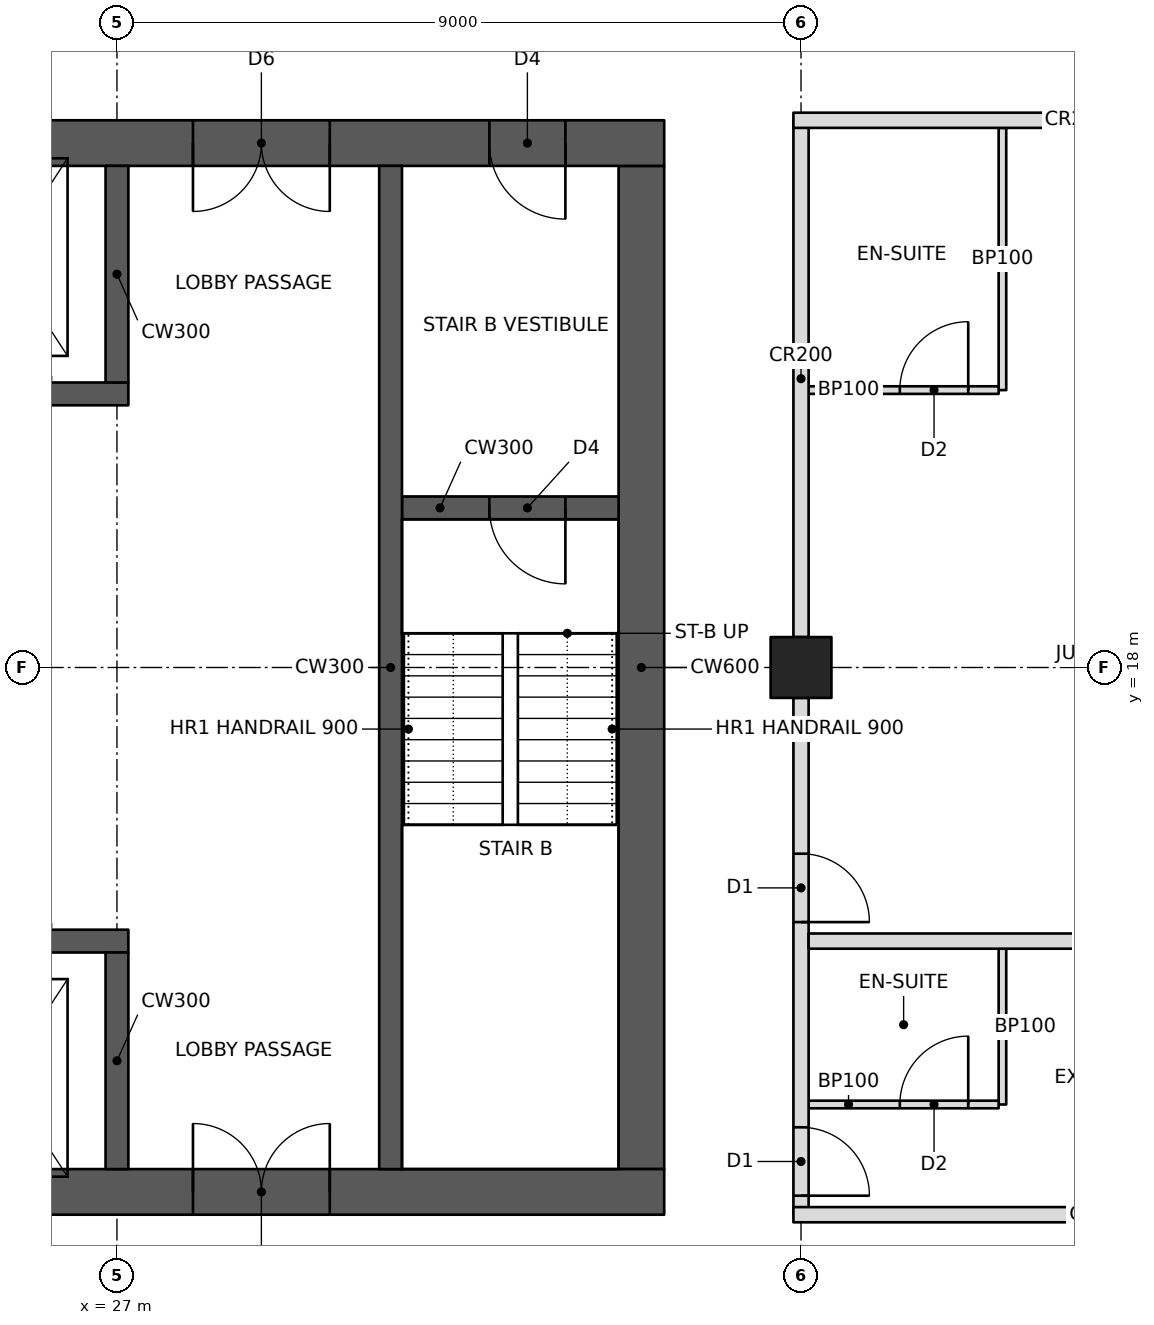
"""IFC4 building model, lengths in metres.
Left out: names, types, materials, properties, quantities, classifications, styles, units other than length and angle.
Written with IfcOpenShell. Run it as: python <this file> out.ifc"""

import sys

from ifc_helpers import new_model, si_unit, direction, frame, frame_2d, origin, origin_2d, place, context, subcontext, project, spatial, rectangle, hollow_rectangle, extrude, element, fill, save


model = new_model("IFC4")
c1 = context("Model", 3, precision=1e-05, world=origin(), true_north=direction((0.0, 1.0)))
c2 = subcontext(c1, "Body", "Model", "MODEL_VIEW")
j1 = project(units=[si_unit("LENGTHUNIT", "METRE"), si_unit("PLANEANGLEUNIT", "RADIAN")], contexts=[c1])
p1 = place(None, origin())
s1 = spatial("IfcSite", under=j1, at=p1, CompositionType="ELEMENT")
p2 = place(p1, origin())
s2 = spatial("IfcBuilding", under=s1, at=p2, CompositionType="ELEMENT")
p3 = place(p2, frame((0.0, 0.0, 174.0)))
s3 = spatial("IfcBuildingStorey", under=s2, at=p3, CompositionType="ELEMENT", Elevation=174.0)
p4 = place(p3, frame((36.0, 18.0, 0.0), z_axis=(0.0, 0.0, 1.0), x_axis=(0.0, 1.0, 0.0)))
e1 = element("IfcColumn", 1, at=p4, inside=s3, PredefinedType="COLUMN", context=c2, shape_type="SweptSolid", body=[
    extrude(hollow_rectangle(XDim=0.8, YDim=0.8, WallThickness=0.06, at=origin_2d()), origin(), (0.0, 0.0, 1.0), 3.4),
])
p5 = place(p3, frame((10.8, 11.1, 0.0), z_axis=(0.0, 0.0, 1.0), x_axis=(1.0, 0.0, 0.0)))
e2 = element("IfcWall", 2, at=p5, inside=s3, PredefinedType="SHEAR", context=c2, shape_type="SweptSolid", body=[
    extrude(rectangle(XDim=23.4, YDim=0.6, at=frame_2d((11.7, 0.0))), origin(), (0.0, 0.0, 1.0), 3.4),
])
p6 = place(p5, frame((1.0, 0.0, 0.0)))
e3 = element("IfcOpeningElement", 3, at=p6, cuts=e2, PredefinedType="OPENING", context=c2, shape_type="SweptSolid", body=[
    extrude(rectangle(XDim=1.0, YDim=2.1, at=frame_2d((0.5, 1.05))), frame((0.0, 0.31, 0.0), z_axis=(0.0, -1.0, 0.0), x_axis=(1.0, 0.0, 0.0)), (0.0, 0.0, 1.0), 0.62),
])
p7 = place(p5, frame((17.2, 0.0, 0.0)))
e4 = element("IfcOpeningElement", 4, at=p7, cuts=e2, PredefinedType="OPENING", context=c2, shape_type="SweptSolid", body=[
    extrude(rectangle(XDim=1.8, YDim=2.1, at=frame_2d((0.9, 1.05))), frame((0.0, 0.31, 0.0), z_axis=(0.0, -1.0, 0.0), x_axis=(1.0, 0.0, 0.0)), (0.0, 0.0, 1.0), 0.62),
])
p8 = place(p3, frame((10.8, 24.9, 0.0), z_axis=(0.0, 0.0, 1.0), x_axis=(1.0, 0.0, 0.0)))
e5 = element("IfcWall", 5, at=p8, inside=s3, PredefinedType="SHEAR", context=c2, shape_type="SweptSolid", body=[
    extrude(rectangle(XDim=23.4, YDim=0.6, at=frame_2d((11.7, 0.0))), origin(), (0.0, 0.0, 1.0), 3.4),
])
p9 = place(p8, frame((17.2, 0.0, 0.0)))
e6 = element("IfcOpeningElement", 6, at=p9, cuts=e5, PredefinedType="OPENING", context=c2, shape_type="SweptSolid", body=[
    extrude(rectangle(XDim=1.8, YDim=2.1, at=frame_2d((0.9, 1.05))), frame((0.0, 0.31, 0.0), z_axis=(0.0, -1.0, 0.0), x_axis=(1.0, 0.0, 0.0)), (0.0, 0.0, 1.0), 0.62),
])
p10 = place(p8, frame((21.1, 0.0, 0.0)))
e7 = element("IfcOpeningElement", 7, at=p10, cuts=e5, PredefinedType="OPENING", context=c2, shape_type="SweptSolid", body=[
    extrude(rectangle(XDim=1.0, YDim=2.1, at=frame_2d((0.5, 1.05))), frame((0.0, 0.31, 0.0), z_axis=(0.0, -1.0, 0.0), x_axis=(1.0, 0.0, 0.0)), (0.0, 0.0, 1.0), 0.62),
])
p11 = place(p8, frame((4.9, 0.0, 0.0)))
e8 = element("IfcOpeningElement", 8, at=p11, cuts=e5, PredefinedType="OPENING", context=c2, shape_type="SweptSolid", body=[
    extrude(rectangle(XDim=1.0, YDim=2.1, at=frame_2d((0.5, 1.05))), frame((0.0, 0.31, 0.0), z_axis=(0.0, -1.0, 0.0), x_axis=(1.0, 0.0, 0.0)), (0.0, 0.0, 1.0), 0.62),
])
p12 = place(p3, frame((33.9, 11.4, 0.0), z_axis=(0.0, 0.0, 1.0), x_axis=(0.0, 1.0, 0.0)))
e9 = element("IfcWall", 9, at=p12, inside=s3, PredefinedType="SHEAR", context=c2, shape_type="SweptSolid", body=[
    extrude(rectangle(XDim=13.2, YDim=0.6, at=frame_2d((6.6, 0.0))), origin(), (0.0, 0.0, 1.0), 3.4),
])
p13 = place(p3, frame((18.15, 14.4, 0.0), z_axis=(0.0, 0.0, 1.0), x_axis=(1.0, 0.0, 0.0)))
e10 = element("IfcWall", 10, at=p13, inside=s3, PredefinedType="SHEAR", context=c2, shape_type="SweptSolid", body=[
    extrude(rectangle(XDim=9.0, YDim=0.3, at=frame_2d((4.5, 0.0))), origin(), (0.0, 0.0, 1.0), 3.4),
])
p14 = place(p13, frame((0.8, 0.0, 0.0)))
e11 = element("IfcOpeningElement", 11, at=p14, cuts=e10, PredefinedType="OPENING", context=c2, shape_type="SweptSolid", body=[
    extrude(rectangle(XDim=1.1, YDim=2.1, at=frame_2d((0.55, 1.05))), frame((0.0, 0.16, 0.0), z_axis=(0.0, -1.0, 0.0), x_axis=(1.0, 0.0, 0.0)), (0.0, 0.0, 1.0), 0.32),
])
p15 = place(p13, frame((6.75, 0.0, 0.0)))
e12 = element("IfcOpeningElement", 12, at=p15, cuts=e10, PredefinedType="OPENING", context=c2, shape_type="SweptSolid", body=[
    extrude(rectangle(XDim=1.2, YDim=2.1, at=frame_2d((0.6, 1.05))), frame((0.0, 0.16, 0.0), z_axis=(0.0, -1.0, 0.0), x_axis=(1.0, 0.0, 0.0)), (0.0, 0.0, 1.0), 0.32),
])
p16 = place(p13, frame((3.8, 0.0, 0.0)))
e13 = element("IfcOpeningElement", 13, at=p16, cuts=e10, PredefinedType="OPENING", context=c2, shape_type="SweptSolid", body=[
    extrude(rectangle(XDim=1.1, YDim=2.1, at=frame_2d((0.55, 1.05))), frame((0.0, 0.16, 0.0), z_axis=(0.0, -1.0, 0.0), x_axis=(1.0, 0.0, 0.0)), (0.0, 0.0, 1.0), 0.32),
])
p17 = place(p3, frame((27.0, 11.4, 0.0), z_axis=(0.0, 0.0, 1.0), x_axis=(0.0, 1.0, 0.0)))
e14 = element("IfcWall", 14, at=p17, inside=s3, PredefinedType="SHEAR", context=c2, shape_type="SweptSolid", body=[
    extrude(rectangle(XDim=2.85, YDim=0.3, at=frame_2d((1.425, 0.0))), origin(), (0.0, 0.0, 1.0), 3.4),
])
p18 = place(p3, frame((18.15, 21.6, 0.0), z_axis=(0.0, 0.0, 1.0), x_axis=(1.0, 0.0, 0.0)))
e15 = element("IfcWall", 15, at=p18, inside=s3, PredefinedType="SHEAR", context=c2, shape_type="SweptSolid", body=[
    extrude(rectangle(XDim=9.0, YDim=0.3, at=frame_2d((4.5, 0.0))), origin(), (0.0, 0.0, 1.0), 3.4),
])
p19 = place(p18, frame((6.75, 0.0, 0.0)))
e16 = element("IfcOpeningElement", 16, at=p19, cuts=e15, PredefinedType="OPENING", context=c2, shape_type="SweptSolid", body=[
    extrude(rectangle(XDim=1.2, YDim=2.1, at=frame_2d((0.6, 1.05))), frame((0.0, 0.16, 0.0), z_axis=(0.0, -1.0, 0.0), x_axis=(1.0, 0.0, 0.0)), (0.0, 0.0, 1.0), 0.32),
])
p20 = place(p18, frame((0.8, 0.0, 0.0)))
e17 = element("IfcOpeningElement", 17, at=p20, cuts=e15, PredefinedType="OPENING", context=c2, shape_type="SweptSolid", body=[
    extrude(rectangle(XDim=1.1, YDim=2.1, at=frame_2d((0.55, 1.05))), frame((0.0, 0.16, 0.0), z_axis=(0.0, -1.0, 0.0), x_axis=(1.0, 0.0, 0.0)), (0.0, 0.0, 1.0), 0.32),
])
p21 = place(p18, frame((3.8, 0.0, 0.0)))
e18 = element("IfcOpeningElement", 18, at=p21, cuts=e15, PredefinedType="OPENING", context=c2, shape_type="SweptSolid", body=[
    extrude(rectangle(XDim=1.1, YDim=2.1, at=frame_2d((0.55, 1.05))), frame((0.0, 0.16, 0.0), z_axis=(0.0, -1.0, 0.0), x_axis=(1.0, 0.0, 0.0)), (0.0, 0.0, 1.0), 0.32),
])
p22 = place(p3, frame((27.0, 21.75, 0.0), z_axis=(0.0, 0.0, 1.0), x_axis=(0.0, 1.0, 0.0)))
e19 = element("IfcWall", 19, at=p22, inside=s3, PredefinedType="SHEAR", context=c2, shape_type="SweptSolid", body=[
    extrude(rectangle(XDim=2.85, YDim=0.3, at=frame_2d((1.425, 0.0))), origin(), (0.0, 0.0, 1.0), 3.4),
])
p23 = place(p3, frame((30.6, 11.4, 0.0), z_axis=(0.0, 0.0, 1.0), x_axis=(0.0, 1.0, 0.0)))
e20 = element("IfcWall", 20, at=p23, inside=s3, PredefinedType="SHEAR", context=c2, shape_type="SweptSolid", body=[
    extrude(rectangle(XDim=13.2, YDim=0.3, at=frame_2d((6.6, 0.0))), origin(), (0.0, 0.0, 1.0), 3.4),
])
p24 = place(p3, frame((30.75, 20.1, 0.0), z_axis=(0.0, 0.0, 1.0), x_axis=(1.0, 0.0, 0.0)))
e21 = element("IfcWall", 21, at=p24, inside=s3, PredefinedType="SHEAR", context=c2, shape_type="SweptSolid", body=[
    extrude(rectangle(XDim=2.85, YDim=0.3, at=frame_2d((1.425, 0.0))), origin(), (0.0, 0.0, 1.0), 3.4),
])
p25 = place(p24, frame((1.15, 0.0, 0.0)))
e22 = element("IfcOpeningElement", 22, at=p25, cuts=e21, PredefinedType="OPENING", context=c2, shape_type="SweptSolid", body=[
    extrude(rectangle(XDim=1.0, YDim=2.1, at=frame_2d((0.5, 1.05))), frame((0.0, 0.16, 0.0), z_axis=(0.0, -1.0, 0.0), x_axis=(1.0, 0.0, 0.0)), (0.0, 0.0, 1.0), 0.32),
])
p26 = place(p3, frame((36.0, 10.8, 0.0), z_axis=(0.0, 0.0, 1.0), x_axis=(0.0, 1.0, 0.0)))
e23 = element("IfcWall", 23, at=p26, inside=s3, PredefinedType="PARTITIONING", context=c2, shape_type="SweptSolid", body=[
    extrude(rectangle(XDim=6.8, YDim=0.2, at=frame_2d((3.4, 0.0))), origin(), (0.0, 0.0, 1.0), 2.405),
])
p27 = place(p26, frame((0.25, 0.0, 0.0)))
e24 = element("IfcOpeningElement", 24, at=p27, cuts=e23, PredefinedType="OPENING", context=c2, shape_type="SweptSolid", body=[
    extrude(rectangle(XDim=0.9, YDim=2.1, at=frame_2d((0.45, 1.05))), frame((0.0, 0.11, 0.0), z_axis=(0.0, -1.0, 0.0), x_axis=(1.0, 0.0, 0.0)), (0.0, 0.0, 1.0), 0.22),
])
p28 = place(p26, frame((3.85, 0.0, 0.0)))
e25 = element("IfcOpeningElement", 25, at=p28, cuts=e23, PredefinedType="OPENING", context=c2, shape_type="SweptSolid", body=[
    extrude(rectangle(XDim=0.9, YDim=2.1, at=frame_2d((0.45, 1.05))), frame((0.0, 0.11, 0.0), z_axis=(0.0, -1.0, 0.0), x_axis=(1.0, 0.0, 0.0)), (0.0, 0.0, 1.0), 0.22),
])
p29 = place(p3, frame((36.0, 18.4, 0.0), z_axis=(0.0, 0.0, 1.0), x_axis=(0.0, 1.0, 0.0)))
e26 = element("IfcWall", 26, at=p29, inside=s3, PredefinedType="PARTITIONING", context=c2, shape_type="SweptSolid", body=[
    extrude(rectangle(XDim=6.8, YDim=0.2, at=frame_2d((3.4, 0.0))), origin(), (0.0, 0.0, 1.0), 2.405),
])
p30 = place(p3, frame((35.9, 10.8, 0.0), z_axis=(0.0, 0.0, 1.0), x_axis=(1.0, 0.0, 0.0)))
e27 = element("IfcWall", 27, at=p30, inside=s3, PredefinedType="PARTITIONING", context=c2, shape_type="SweptSolid", body=[
    extrude(rectangle(XDim=8.1, YDim=0.2, at=frame_2d((4.05, 0.0))), origin(), (0.0, 0.0, 1.0), 2.404),
])
p31 = place(p3, frame((35.9, 25.2, 0.0), z_axis=(0.0, 0.0, 1.0), x_axis=(1.0, 0.0, 0.0)))
e28 = element("IfcWall", 28, at=p31, inside=s3, PredefinedType="PARTITIONING", context=c2, shape_type="SweptSolid", body=[
    extrude(rectangle(XDim=7.45, YDim=0.2, at=frame_2d((3.725, 0.0))), origin(), (0.0, 0.0, 1.0), 2.404),
])
p32 = place(p3, frame((36.1, 14.4, 0.0), z_axis=(0.0, 0.0, 1.0), x_axis=(1.0, 0.0, 0.0)))
e29 = element("IfcWall", 29, at=p32, inside=s3, PredefinedType="PARTITIONING", context=c2, shape_type="SweptSolid", body=[
    extrude(rectangle(XDim=7.9, YDim=0.2, at=frame_2d((3.95, 0.0))), origin(), (0.0, 0.0, 1.0), 2.404),
])
p33 = place(p3, frame((38.65, 12.25, 0.0), z_axis=(0.0, 0.0, 1.0), x_axis=(0.0, 1.0, 0.0)))
e30 = element("IfcWall", 30, at=p33, inside=s3, PredefinedType="PARTITIONING", context=c2, shape_type="SweptSolid", body=[
    extrude(rectangle(XDim=2.05, YDim=0.1, at=frame_2d((1.025, 0.0))), origin(), (0.0, 0.0, 1.0), 3.2),
])
p34 = place(p3, frame((36.1, 12.25, 0.0), z_axis=(0.0, 0.0, 1.0), x_axis=(1.0, 0.0, 0.0)))
e31 = element("IfcWall", 31, at=p34, inside=s3, PredefinedType="PARTITIONING", context=c2, shape_type="SweptSolid", body=[
    extrude(rectangle(XDim=2.5, YDim=0.1, at=frame_2d((1.25, 0.0))), origin(), (0.0, 0.0, 1.0), 2.404),
])
p35 = place(p34, frame((1.2, 0.0, 0.0)))
e32 = element("IfcOpeningElement", 32, at=p35, cuts=e31, PredefinedType="OPENING", context=c2, shape_type="SweptSolid", body=[
    extrude(rectangle(XDim=0.9, YDim=2.1, at=frame_2d((0.45, 1.05))), frame((0.0, 0.06, 0.0), z_axis=(0.0, -1.0, 0.0), x_axis=(1.0, 0.0, 0.0)), (0.0, 0.0, 1.0), 0.12),
])
p36 = place(p3, frame((38.65, 21.65, 0.0), z_axis=(0.0, 0.0, 1.0), x_axis=(0.0, 1.0, 0.0)))
e33 = element("IfcWall", 33, at=p36, inside=s3, PredefinedType="PARTITIONING", context=c2, shape_type="SweptSolid", body=[
    extrude(rectangle(XDim=3.45, YDim=0.1, at=frame_2d((1.725, 0.0))), origin(), (0.0, 0.0, 1.0), 3.2),
])
p37 = place(p3, frame((36.1, 21.65, 0.0), z_axis=(0.0, 0.0, 1.0), x_axis=(1.0, 0.0, 0.0)))
e34 = element("IfcWall", 34, at=p37, inside=s3, PredefinedType="PARTITIONING", context=c2, shape_type="SweptSolid", body=[
    extrude(rectangle(XDim=2.5, YDim=0.1, at=frame_2d((1.25, 0.0))), origin(), (0.0, 0.0, 1.0), 2.404),
])
p38 = place(p37, frame((1.2, 0.0, 0.0)))
e35 = element("IfcOpeningElement", 35, at=p38, cuts=e34, PredefinedType="OPENING", context=c2, shape_type="SweptSolid", body=[
    extrude(rectangle(XDim=0.9, YDim=2.1, at=frame_2d((0.45, 1.05))), frame((0.0, 0.06, 0.0), z_axis=(0.0, -1.0, 0.0), x_axis=(1.0, 0.0, 0.0)), (0.0, 0.0, 1.0), 0.12),
])
p39 = place(p35, origin())
e36 = element("IfcDoor", 36, at=p39, inside=s3, OperationType="SINGLE_SWING_RIGHT", PredefinedType="DOOR", context=c2, shape_type="SweptSolid", body=[
    extrude(rectangle(XDim=0.9, YDim=2.1, at=frame_2d((0.45, 1.05))), frame((0.0, 0.025, 0.0), z_axis=(0.0, -1.0, 0.0), x_axis=(1.0, 0.0, 0.0)), (0.0, 0.0, 1.0), 0.05),
])
fill(e32, e36)
p40 = place(p27, frame((0.9, 0.0, 0.0), z_axis=(0.0, 0.0, 1.0), x_axis=(-1.0, 0.0, 0.0)))
e37 = element("IfcDoor", 37, at=p40, inside=s3, OperationType="SINGLE_SWING_RIGHT", PredefinedType="DOOR", context=c2, shape_type="SweptSolid", body=[
    extrude(rectangle(XDim=0.9, YDim=2.1, at=frame_2d((0.45, 1.05))), frame((0.0, 0.025, 0.0), z_axis=(0.0, -1.0, 0.0), x_axis=(1.0, 0.0, 0.0)), (0.0, 0.0, 1.0), 0.05),
])
fill(e24, e37)
p41 = place(p38, origin())
e38 = element("IfcDoor", 38, at=p41, inside=s3, OperationType="SINGLE_SWING_RIGHT", PredefinedType="DOOR", context=c2, shape_type="SweptSolid", body=[
    extrude(rectangle(XDim=0.9, YDim=2.1, at=frame_2d((0.45, 1.05))), frame((0.0, 0.025, 0.0), z_axis=(0.0, -1.0, 0.0), x_axis=(1.0, 0.0, 0.0)), (0.0, 0.0, 1.0), 0.05),
])
fill(e35, e38)
p42 = place(p28, frame((0.9, 0.0, 0.0), z_axis=(0.0, 0.0, 1.0), x_axis=(-1.0, 0.0, 0.0)))
e39 = element("IfcDoor", 39, at=p42, inside=s3, OperationType="SINGLE_SWING_RIGHT", PredefinedType="DOOR", context=c2, shape_type="SweptSolid", body=[
    extrude(rectangle(XDim=0.9, YDim=2.1, at=frame_2d((0.45, 1.05))), frame((0.0, 0.025, 0.0), z_axis=(0.0, -1.0, 0.0), x_axis=(1.0, 0.0, 0.0)), (0.0, 0.0, 1.0), 0.05),
])
fill(e25, e39)
p43 = place(p7, origin())
e40 = element("IfcDoor", 40, at=p43, inside=s3, OperationType="DOUBLE_DOOR_SINGLE_SWING", PredefinedType="DOOR", context=c2, shape_type="SweptSolid", body=[
    extrude(rectangle(XDim=1.8, YDim=2.1, at=frame_2d((0.9, 1.05))), frame((0.0, 0.025, 0.0), z_axis=(0.0, -1.0, 0.0), x_axis=(1.0, 0.0, 0.0)), (0.0, 0.0, 1.0), 0.05),
])
fill(e4, e40)
p44 = place(p9, frame((1.8, 0.0, 0.0), z_axis=(0.0, 0.0, 1.0), x_axis=(-1.0, 0.0, 0.0)))
e41 = element("IfcDoor", 41, at=p44, inside=s3, OperationType="DOUBLE_DOOR_SINGLE_SWING", PredefinedType="DOOR", context=c2, shape_type="SweptSolid", body=[
    extrude(rectangle(XDim=1.8, YDim=2.1, at=frame_2d((0.9, 1.05))), frame((0.0, 0.025, 0.0), z_axis=(0.0, -1.0, 0.0), x_axis=(1.0, 0.0, 0.0)), (0.0, 0.0, 1.0), 0.05),
])
fill(e6, e41)
p45 = place(p10, frame((1.0, 0.0, 0.0), z_axis=(0.0, 0.0, 1.0), x_axis=(-1.0, 0.0, 0.0)))
e42 = element("IfcDoor", 42, at=p45, inside=s3, OperationType="SINGLE_SWING_LEFT", PredefinedType="DOOR", context=c2, shape_type="SweptSolid", body=[
    extrude(rectangle(XDim=1.0, YDim=2.1, at=frame_2d((0.5, 1.05))), frame((0.0, 0.025, 0.0), z_axis=(0.0, -1.0, 0.0), x_axis=(1.0, 0.0, 0.0)), (0.0, 0.0, 1.0), 0.05),
])
fill(e7, e42)
p46 = place(p25, frame((1.0, 0.0, 0.0), z_axis=(0.0, 0.0, 1.0), x_axis=(-1.0, 0.0, 0.0)))
e43 = element("IfcDoor", 43, at=p46, inside=s3, OperationType="SINGLE_SWING_LEFT", PredefinedType="DOOR", context=c2, shape_type="SweptSolid", body=[
    extrude(rectangle(XDim=1.0, YDim=2.1, at=frame_2d((0.5, 1.05))), frame((0.0, 0.025, 0.0), z_axis=(0.0, -1.0, 0.0), x_axis=(1.0, 0.0, 0.0)), (0.0, 0.0, 1.0), 0.05),
])
fill(e22, e43)
save(model, sys.argv[1])
